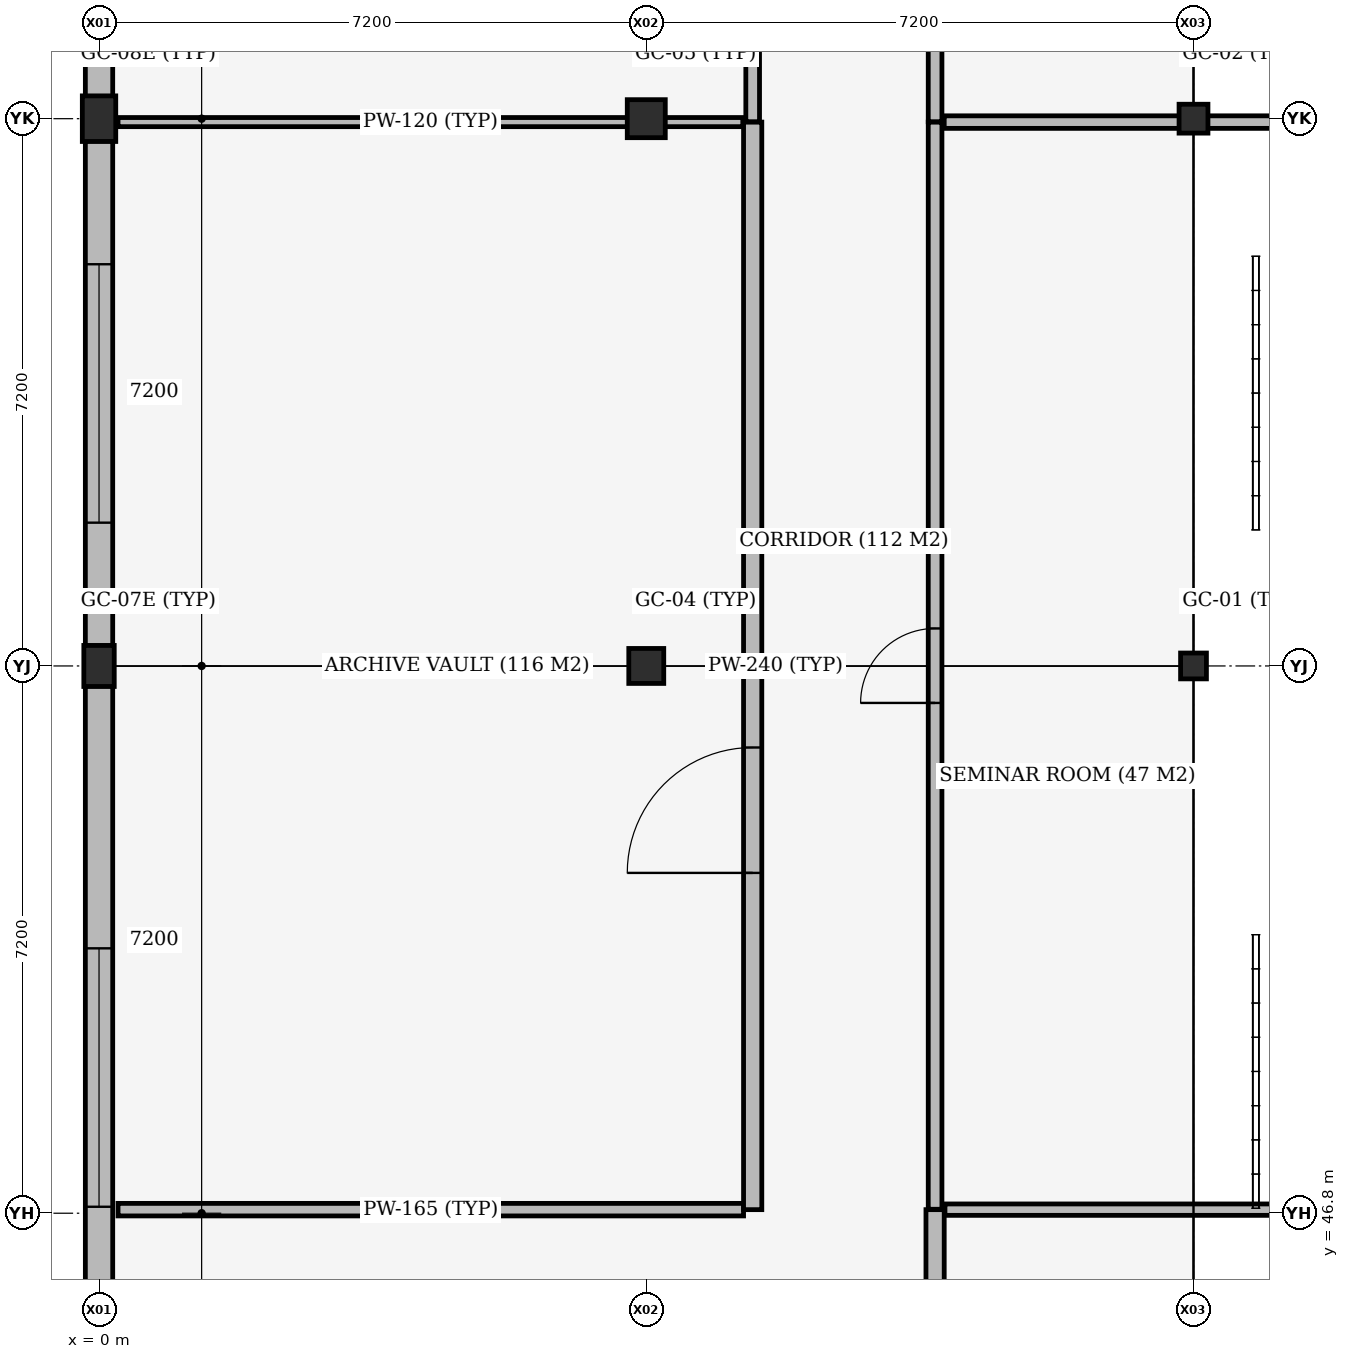
"""IFC4 building model, lengths in metres.
Left out: names, types, materials, properties, quantities, classifications, styles, units other than length and angle.
Written with IfcOpenShell. Run it as: python <this file> out.ifc"""

import sys

from ifc_helpers import new_model, si_unit, direction, frame, frame_2d, origin, origin_2d, place, context, subcontext, project, spatial, rectangle, extrude, element, fill, save


model = new_model("IFC4")
c1 = context("Model", 3, precision=1e-05, world=origin(), true_north=direction((0.0, 1.0)))
c2 = subcontext(c1, "Body", "Model", "MODEL_VIEW")
j1 = project(units=[si_unit("LENGTHUNIT", "METRE"), si_unit("PLANEANGLEUNIT", "RADIAN")], contexts=[c1])
p1 = place(None, origin())
s1 = spatial("IfcSite", under=j1, at=p1, CompositionType="ELEMENT")
p2 = place(p1, origin())
s2 = spatial("IfcBuilding", under=s1, at=p2, CompositionType="ELEMENT")
p3 = place(p2, frame((0.0, 0.0, 13.8)))
s3 = spatial("IfcBuildingStorey", under=s2, at=p3, CompositionType="ELEMENT", Elevation=13.8)
p4 = place(p3, frame((0.0, 54.0, 0.0), z_axis=(0.0, 0.0, 1.0), x_axis=(1.0, 0.0, 0.0)))
e1 = element("IfcColumn", 1, at=p4, inside=s3, PredefinedType="COLUMN", context=c2, shape_type="SweptSolid", body=[
    extrude(rectangle(XDim=0.4, YDim=0.54, at=origin_2d()), origin(), (0.0, 0.0, 1.0), 3.92),
])
p5 = place(p3, frame((0.0, 61.2, 0.0), z_axis=(0.0, 0.0, 1.0), x_axis=(1.0, 0.0, 0.0)))
e2 = element("IfcColumn", 2, at=p5, inside=s3, PredefinedType="COLUMN", context=c2, shape_type="SweptSolid", body=[
    extrude(rectangle(XDim=0.44, YDim=0.6, at=origin_2d()), origin(), (0.0, 0.0, 1.0), 3.92),
])
p6 = place(p3, frame((7.2, 54.0, 0.0), z_axis=(0.0, 0.0, 1.0), x_axis=(1.0, 0.0, 0.0)))
e3 = element("IfcColumn", 3, at=p6, inside=s3, PredefinedType="COLUMN", context=c2, shape_type="SweptSolid", body=[
    extrude(rectangle(XDim=0.46, YDim=0.46, at=origin_2d()), origin(), (0.0, 0.0, 1.0), 3.92),
])
p7 = place(p3, frame((7.2, 61.2, 0.0), z_axis=(0.0, 0.0, 1.0), x_axis=(1.0, 0.0, 0.0)))
e4 = element("IfcColumn", 4, at=p7, inside=s3, PredefinedType="COLUMN", context=c2, shape_type="SweptSolid", body=[
    extrude(rectangle(XDim=0.5, YDim=0.5, at=origin_2d()), origin(), (0.0, 0.0, 1.0), 3.92),
])
p8 = place(p3, frame((14.4, 54.0, 0.0), z_axis=(0.0, 0.0, 1.0), x_axis=(1.0, 0.0, 0.0)))
e5 = element("IfcColumn", 5, at=p8, inside=s3, PredefinedType="COLUMN", context=c2, shape_type="SweptSolid", body=[
    extrude(rectangle(XDim=0.34, YDim=0.34, at=origin_2d()), origin(), (0.0, 0.0, 1.0), 3.92),
])
p9 = place(p3, frame((14.4, 61.2, 0.0), z_axis=(0.0, 0.0, 1.0), x_axis=(1.0, 0.0, 0.0)))
e6 = element("IfcColumn", 6, at=p9, inside=s3, PredefinedType="COLUMN", context=c2, shape_type="SweptSolid", body=[
    extrude(rectangle(XDim=0.38, YDim=0.38, at=origin_2d()), origin(), (0.0, 0.0, 1.0), 3.92),
])
p10 = place(p3, frame((0.0, 43.432, 0.0), z_axis=(0.0, 0.0, 1.0), x_axis=(0.0, 1.0, 0.0)))
e7 = element("IfcWall", 7, at=p10, inside=s3, PredefinedType="STANDARD", context=c2, shape_type="SweptSolid", body=[
    extrude(rectangle(XDim=10.306, YDim=0.36, at=frame_2d((5.153, 0.0))), origin(), (0.0, 0.0, 1.0), 3.4),
])
p11 = place(p10, frame((3.453, 0.0, 0.9)))
e8 = element("IfcOpeningElement", 8, at=p11, cuts=e7, PredefinedType="OPENING", context=c2, shape_type="SweptSolid", body=[
    extrude(rectangle(XDim=3.4, YDim=1.5, at=frame_2d((1.7, 0.75))), frame((0.0, 0.19, 0.0), z_axis=(0.0, -1.0, 0.0), x_axis=(1.0, 0.0, 0.0)), (0.0, 0.0, 1.0), 0.38),
])
p12 = place(p3, frame((0.0, 54.262, 0.0), z_axis=(0.0, 0.0, 1.0), x_axis=(0.0, 1.0, 0.0)))
e9 = element("IfcWall", 9, at=p12, inside=s3, PredefinedType="STANDARD", context=c2, shape_type="SweptSolid", body=[
    extrude(rectangle(XDim=6.646, YDim=0.36, at=frame_2d((3.323, 0.0))), origin(), (0.0, 0.0, 1.0), 3.34),
])
p13 = place(p12, frame((1.623, 0.0, 0.9)))
e10 = element("IfcOpeningElement", 10, at=p13, cuts=e9, PredefinedType="OPENING", context=c2, shape_type="SweptSolid", body=[
    extrude(rectangle(XDim=3.4, YDim=1.5, at=frame_2d((1.7, 0.75))), frame((0.0, 0.19, 0.0), z_axis=(0.0, -1.0, 0.0), x_axis=(1.0, 0.0, 0.0)), (0.0, 0.0, 1.0), 0.38),
])
p14 = place(p3, frame((0.0, 61.492, 0.0), z_axis=(0.0, 0.0, 1.0), x_axis=(0.0, 1.0, 0.0)))
e11 = element("IfcWall", 11, at=p14, inside=s3, PredefinedType="STANDARD", context=c2, shape_type="SweptSolid", body=[
    extrude(rectangle(XDim=6.746, YDim=0.36, at=frame_2d((3.373, 0.0))), origin(), (0.0, 0.0, 1.0), 3.24),
])
p15 = place(p14, frame((1.673, 0.0, 0.9)))
e12 = element("IfcOpeningElement", 12, at=p15, cuts=e11, PredefinedType="OPENING", context=c2, shape_type="SweptSolid", body=[
    extrude(rectangle(XDim=3.4, YDim=1.5, at=frame_2d((1.7, 0.75))), frame((0.0, 0.19, 0.0), z_axis=(0.0, -1.0, 0.0), x_axis=(1.0, 0.0, 0.0)), (0.0, 0.0, 1.0), 0.38),
])
p16 = place(p3, frame((0.25, 46.847, 0.0), z_axis=(0.0, 0.0, 1.0), x_axis=(1.0, 0.0, 0.0)))
e13 = element("IfcWall", 13, at=p16, inside=s3, PredefinedType="PARTITIONING", context=c2, shape_type="SweptSolid", body=[
    extrude(rectangle(XDim=8.23, YDim=0.165, at=frame_2d((4.115, 0.0))), origin(), (0.0, 0.0, 1.0), 3.24),
])
p17 = place(p3, frame((8.6, 46.847, 0.0), z_axis=(0.0, 0.0, 1.0), x_axis=(0.0, 1.0, 0.0)))
e14 = element("IfcWall", 14, at=p17, inside=s3, PredefinedType="STANDARD", context=c2, shape_type="SweptSolid", body=[
    extrude(rectangle(XDim=14.308, YDim=0.24, at=frame_2d((7.154, 0.0))), origin(), (0.0, 0.0, 1.0), 3.34),
])
p18 = place(p17, frame((4.43, 0.0, 0.0)))
e15 = element("IfcOpeningElement", 15, at=p18, cuts=e14, PredefinedType="OPENING", context=c2, shape_type="SweptSolid", body=[
    extrude(rectangle(XDim=1.65, YDim=2.25, at=frame_2d((0.825, 1.125))), frame((0.0, 0.13, 0.0), z_axis=(0.0, -1.0, 0.0), x_axis=(1.0, 0.0, 0.0)), (0.0, 0.0, 1.0), 0.26),
])
p19 = place(p3, frame((0.25, 61.155, 0.0), z_axis=(0.0, 0.0, 1.0), x_axis=(1.0, 0.0, 0.0)))
e16 = element("IfcWall", 16, at=p19, inside=s3, PredefinedType="PARTITIONING", context=c2, shape_type="SweptSolid", body=[
    extrude(rectangle(XDim=8.22, YDim=0.12, at=frame_2d((4.11, 0.0))), origin(), (0.0, 0.0, 1.0), 3.18),
])
p20 = place(p3, frame((8.6, 61.16, 0.0), z_axis=(0.0, 0.0, 1.0), x_axis=(0.0, 1.0, 0.0)))
e17 = element("IfcWall", 17, at=p20, inside=s3, PredefinedType="PARTITIONING", context=c2, shape_type="SweptSolid", body=[
    extrude(rectangle(XDim=7.235, YDim=0.18, at=frame_2d((3.618, 0.0))), origin(), (0.0, 0.0, 1.0), 3.18),
])
p21 = place(p20, frame((3.127, 0.0, 0.0)))
e18 = element("IfcOpeningElement", 18, at=p21, cuts=e17, PredefinedType="OPENING", context=c2, shape_type="SweptSolid", body=[
    extrude(rectangle(XDim=0.98, YDim=2.18, at=frame_2d((0.49, 1.09))), frame((0.0, 0.1, 0.0), z_axis=(0.0, -1.0, 0.0), x_axis=(1.0, 0.0, 0.0)), (0.0, 0.0, 1.0), 0.2),
])
p22 = place(p3, frame((11.0, 25.385, 0.0), z_axis=(0.0, 0.0, 1.0), x_axis=(0.0, 1.0, 0.0)))
e19 = element("IfcWall", 19, at=p22, inside=s3, PredefinedType="STANDARD", context=c2, shape_type="SweptSolid", body=[
    extrude(rectangle(XDim=21.462, YDim=0.24, at=frame_2d((10.731, 0.0))), origin(), (0.0, 0.0, 1.0), 3.28),
])
p23 = place(p22, frame((9.906, 0.0, 0.0)))
e20 = element("IfcOpeningElement", 20, at=p23, cuts=e19, PredefinedType="OPENING", context=c2, shape_type="SweptSolid", body=[
    extrude(rectangle(XDim=1.65, YDim=2.25, at=frame_2d((0.825, 1.125))), frame((0.0, 0.13, 0.0), z_axis=(0.0, -1.0, 0.0), x_axis=(1.0, 0.0, 0.0)), (0.0, 0.0, 1.0), 0.26),
])
p24 = place(p3, frame((11.13, 46.847, 0.0), z_axis=(0.0, 0.0, 1.0), x_axis=(1.0, 0.0, 0.0)))
e21 = element("IfcWall", 21, at=p24, inside=s3, PredefinedType="PARTITIONING", context=c2, shape_type="SweptSolid", body=[
    extrude(rectangle(XDim=18.95, YDim=0.15, at=frame_2d((9.475, 0.0))), origin(), (0.0, 0.0, 1.0), 3.28),
])
p25 = place(p3, frame((11.0, 46.852, 0.0), z_axis=(0.0, 0.0, 1.0), x_axis=(0.0, 1.0, 0.0)))
e22 = element("IfcWall", 22, at=p25, inside=s3, PredefinedType="PARTITIONING", context=c2, shape_type="SweptSolid", body=[
    extrude(rectangle(XDim=14.303, YDim=0.18, at=frame_2d((7.151, 0.0))), origin(), (0.0, 0.0, 1.0), 3.34),
])
p26 = place(p25, frame((6.662, 0.0, 0.0)))
e23 = element("IfcOpeningElement", 23, at=p26, cuts=e22, PredefinedType="OPENING", context=c2, shape_type="SweptSolid", body=[
    extrude(rectangle(XDim=0.98, YDim=2.18, at=frame_2d((0.49, 1.09))), frame((0.0, 0.1, 0.0), z_axis=(0.0, -1.0, 0.0), x_axis=(1.0, 0.0, 0.0)), (0.0, 0.0, 1.0), 0.2),
])
p27 = place(p3, frame((11.12, 61.155, 0.0), z_axis=(0.0, 0.0, 1.0), x_axis=(1.0, 0.0, 0.0)))
e24 = element("IfcWall", 24, at=p27, inside=s3, PredefinedType="PARTITIONING", context=c2, shape_type="SweptSolid", body=[
    extrude(rectangle(XDim=3.36, YDim=0.165, at=frame_2d((1.68, 0.0))), origin(), (0.0, 0.0, 1.0), 3.18),
])
p28 = place(p3, frame((11.0, 61.16, 0.0), z_axis=(0.0, 0.0, 1.0), x_axis=(0.0, 1.0, 0.0)))
e25 = element("IfcWall", 25, at=p28, inside=s3, PredefinedType="PARTITIONING", context=c2, shape_type="SweptSolid", body=[
    extrude(rectangle(XDim=7.235, YDim=0.18, at=frame_2d((3.618, 0.0))), origin(), (0.0, 0.0, 1.0), 3.18),
])
p29 = place(p28, frame((3.123, 0.0, 0.0)))
e26 = element("IfcOpeningElement", 26, at=p29, cuts=e25, PredefinedType="OPENING", context=c2, shape_type="SweptSolid", body=[
    extrude(rectangle(XDim=0.99, YDim=2.18, at=frame_2d((0.495, 1.09))), frame((0.0, 0.1, 0.0), z_axis=(0.0, -1.0, 0.0), x_axis=(1.0, 0.0, 0.0)), (0.0, 0.0, 1.0), 0.2),
])
p30 = place(p3, frame((14.485, 61.155, 0.0), z_axis=(0.0, 0.0, 1.0), x_axis=(1.0, 0.0, 0.0)))
e27 = element("IfcWall", 27, at=p30, inside=s3, PredefinedType="PARTITIONING", context=c2, shape_type="SweptSolid", body=[
    extrude(rectangle(XDim=15.595, YDim=0.165, at=frame_2d((7.797, 0.0))), origin(), (0.0, 0.0, 1.0), 3.18),
])
p31 = place(p11, origin())
e28 = element("IfcWindow", 28, at=p31, inside=s3, PartitioningType="DOUBLE_PANEL_VERTICAL", PredefinedType="WINDOW", context=c2, shape_type="SweptSolid", body=[
    extrude(rectangle(XDim=3.4, YDim=1.5, at=frame_2d((1.7, 0.75))), frame((0.0, 0.03, 0.0), z_axis=(0.0, -1.0, 0.0), x_axis=(1.0, 0.0, 0.0)), (0.0, 0.0, 1.0), 0.06),
])
fill(e8, e28)
p32 = place(p13, origin())
e29 = element("IfcWindow", 29, at=p32, inside=s3, PartitioningType="DOUBLE_PANEL_VERTICAL", PredefinedType="WINDOW", context=c2, shape_type="SweptSolid", body=[
    extrude(rectangle(XDim=3.4, YDim=1.5, at=frame_2d((1.7, 0.75))), frame((0.0, 0.03, 0.0), z_axis=(0.0, -1.0, 0.0), x_axis=(1.0, 0.0, 0.0)), (0.0, 0.0, 1.0), 0.06),
])
fill(e10, e29)
p33 = place(p18, origin())
e30 = element("IfcDoor", 30, at=p33, inside=s3, OperationType="DOUBLE_DOOR_SINGLE_SWING", PredefinedType="DOOR", context=c2, shape_type="SweptSolid", body=[
    extrude(rectangle(XDim=1.65, YDim=2.25, at=frame_2d((0.825, 1.125))), frame((0.0, 0.025, 0.0), z_axis=(0.0, -1.0, 0.0), x_axis=(1.0, 0.0, 0.0)), (0.0, 0.0, 1.0), 0.05),
])
fill(e15, e30)
p34 = place(p26, origin())
e31 = element("IfcDoor", 31, at=p34, inside=s3, OperationType="SINGLE_SWING_LEFT", PredefinedType="DOOR", context=c2, shape_type="SweptSolid", body=[
    extrude(rectangle(XDim=0.98, YDim=2.18, at=frame_2d((0.49, 1.09))), frame((0.0, 0.025, 0.0), z_axis=(0.0, -1.0, 0.0), x_axis=(1.0, 0.0, 0.0)), (0.0, 0.0, 1.0), 0.05),
])
fill(e23, e31)
save(model, sys.argv[1])
